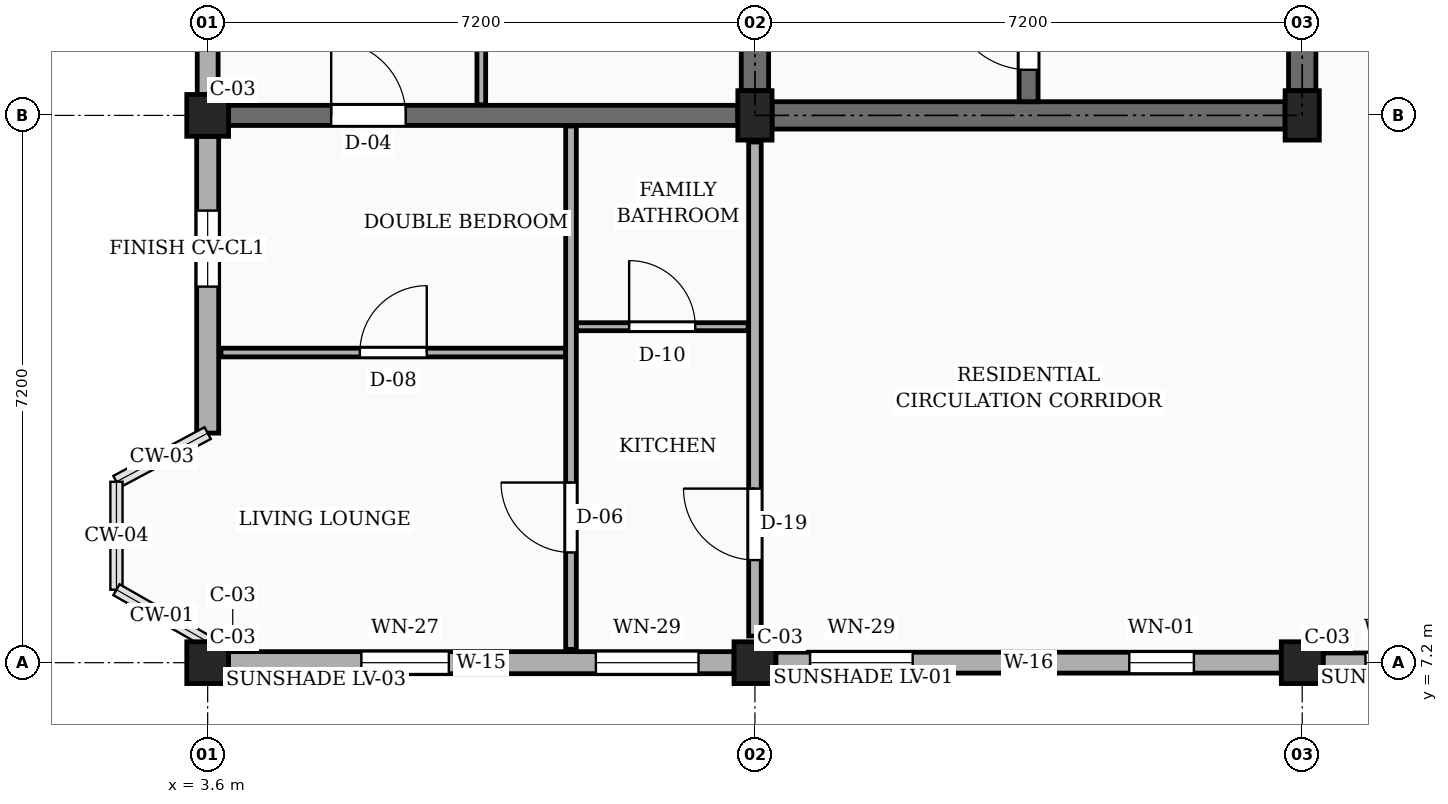
"""IFC4 building model, lengths in metres.
Left out: names, types, materials, properties, quantities, classifications, styles, units other than length and angle.
Written with IfcOpenShell. Run it as: python <this file> out.ifc"""

import sys

from ifc_helpers import new_model, si_unit, direction, frame, frame_2d, origin, origin_2d, place, context, subcontext, project, spatial, rectangle, extrude, element, fill, save


model = new_model("IFC4")
c1 = context("Model", 3, precision=1e-05, world=origin(), true_north=direction((0.0, 1.0)))
c2 = subcontext(c1, "Body", "Model", "MODEL_VIEW")
j1 = project(units=[si_unit("LENGTHUNIT", "METRE"), si_unit("PLANEANGLEUNIT", "RADIAN")], contexts=[c1])
p1 = place(None, origin())
s1 = spatial("IfcSite", under=j1, at=p1, CompositionType="ELEMENT")
p2 = place(p1, origin())
s2 = spatial("IfcBuilding", under=s1, at=p2, CompositionType="ELEMENT")
p3 = place(p2, frame((0.0, 0.0, 10.8)))
s3 = spatial("IfcBuildingStorey", under=s2, at=p3, CompositionType="ELEMENT", Elevation=10.8)
for number, where, z_axis, x_axis in (
    (1, (3.6, 7.2, 0.0), (0.0, 0.0, 1.0), (1.0, 0.0, 0.0)),
    (2, (3.6, 14.4, 0.0), (0.0, 0.0, 1.0), (1.0, 0.0, 0.0)),
    (3, (10.8, 7.2, 0.0), (0.0, 0.0, 1.0), (1.0, 0.0, 0.0)),
):
    element("IfcColumn", number, at=place(p3, frame(where, z_axis=z_axis, x_axis=x_axis)), inside=s3, PredefinedType="COLUMN", context=c2, shape_type="SweptSolid", body=[
        extrude(rectangle(XDim=0.55, YDim=0.55, at=origin_2d()), origin(), (0.0, 0.0, 1.0), 3.15),
    ])
p4 = place(p3, frame((10.8, 14.4, 0.0), z_axis=(0.0, 0.0, 1.0), x_axis=(1.0, 0.0, 0.0)))
e4 = element("IfcColumn", 4, at=p4, inside=s3, PredefinedType="COLUMN", context=c2, shape_type="SweptSolid", body=[
    extrude(rectangle(XDim=0.45, YDim=0.65, at=origin_2d()), origin(), (0.0, 0.0, 1.0), 3.15),
])
p5 = place(p3, frame((18.0, 7.2, 0.0), z_axis=(0.0, 0.0, 1.0), x_axis=(1.0, 0.0, 0.0)))
e5 = element("IfcColumn", 5, at=p5, inside=s3, PredefinedType="COLUMN", context=c2, shape_type="SweptSolid", body=[
    extrude(rectangle(XDim=0.55, YDim=0.55, at=origin_2d()), origin(), (0.0, 0.0, 1.0), 3.15),
])
p6 = place(p3, frame((18.0, 14.4, 0.0), z_axis=(0.0, 0.0, 1.0), x_axis=(1.0, 0.0, 0.0)))
e6 = element("IfcColumn", 6, at=p6, inside=s3, PredefinedType="COLUMN", context=c2, shape_type="SweptSolid", body=[
    extrude(rectangle(XDim=0.45, YDim=0.65, at=origin_2d()), origin(), (0.0, 0.0, 1.0), 3.15),
])
p7 = place(p3, frame((3.875, 14.4, 0.0), z_axis=(0.0, 0.0, 1.0), x_axis=(1.0, 0.0, 0.0)))
e7 = element("IfcWall", 7, at=p7, inside=s3, PredefinedType="SOLIDWALL", context=c2, shape_type="SweptSolid", body=[
    extrude(rectangle(XDim=6.7, YDim=0.265, at=frame_2d((3.35, 0.0))), origin(), (0.0, 0.0, 1.0), 2.17),
])
p8 = place(p7, frame((1.35, 0.0, 0.0)))
e8 = element("IfcOpeningElement", 8, at=p8, cuts=e7, PredefinedType="OPENING", context=c2, shape_type="SweptSolid", body=[
    extrude(rectangle(XDim=0.98, YDim=2.12, at=frame_2d((0.49, 1.06))), frame((0.0, 0.143, 0.0), z_axis=(0.0, -1.0, 0.0), x_axis=(1.0, 0.0, 0.0)), (0.0, 0.0, 1.0), 0.285),
])
p9 = place(p3, frame((3.875, 7.2, 0.0), z_axis=(0.0, 0.0, 1.0), x_axis=(1.0, 0.0, 0.0)))
e9 = element("IfcWall", 9, at=p9, inside=s3, PredefinedType="SOLIDWALL", context=c2, shape_type="SweptSolid", body=[
    extrude(rectangle(XDim=6.65, YDim=0.29, at=frame_2d((3.325, 0.0))), origin(), (0.0, 0.0, 1.0), 2.44),
])
p10 = place(p9, frame((1.748, 0.0, 0.78)))
e10 = element("IfcOpeningElement", 10, at=p10, cuts=e9, PredefinedType="OPENING", context=c2, shape_type="SweptSolid", body=[
    extrude(rectangle(XDim=1.15, YDim=1.44, at=frame_2d((0.575, 0.72))), frame((0.0, 0.155, 0.0), z_axis=(0.0, -1.0, 0.0), x_axis=(1.0, 0.0, 0.0)), (0.0, 0.0, 1.0), 0.31),
])
p11 = place(p9, frame((4.833, 0.0, 0.78)))
e11 = element("IfcOpeningElement", 11, at=p11, cuts=e9, PredefinedType="OPENING", context=c2, shape_type="SweptSolid", body=[
    extrude(rectangle(XDim=1.35, YDim=1.44, at=frame_2d((0.675, 0.72))), frame((0.0, 0.155, 0.0), z_axis=(0.0, -1.0, 0.0), x_axis=(1.0, 0.0, 0.0)), (0.0, 0.0, 1.0), 0.31),
])
p12 = place(p3, frame((11.075, 7.2, 0.0), z_axis=(0.0, 0.0, 1.0), x_axis=(1.0, 0.0, 0.0)))
e12 = element("IfcWall", 12, at=p12, inside=s3, PredefinedType="SOLIDWALL", context=c2, shape_type="SweptSolid", body=[
    extrude(rectangle(XDim=6.65, YDim=0.275, at=frame_2d((3.325, 0.0))), origin(), (0.0, 0.0, 1.0), 2.44),
])
p13 = place(p12, frame((0.45, 0.0, 0.78)))
e13 = element("IfcOpeningElement", 13, at=p13, cuts=e12, PredefinedType="OPENING", context=c2, shape_type="SweptSolid", body=[
    extrude(rectangle(XDim=1.35, YDim=1.44, at=frame_2d((0.675, 0.72))), frame((0.0, 0.147, 0.0), z_axis=(0.0, -1.0, 0.0), x_axis=(1.0, 0.0, 0.0)), (0.0, 0.0, 1.0), 0.295),
])
p14 = place(p12, frame((4.65, 0.0, 0.78)))
e14 = element("IfcOpeningElement", 14, at=p14, cuts=e12, PredefinedType="OPENING", context=c2, shape_type="SweptSolid", body=[
    extrude(rectangle(XDim=0.85, YDim=1.15, at=frame_2d((0.425, 0.575))), frame((0.0, 0.147, 0.0), z_axis=(0.0, -1.0, 0.0), x_axis=(1.0, 0.0, 0.0)), (0.0, 0.0, 1.0), 0.295),
])
p15 = place(p3, frame((18.275, 7.2, 0.0), z_axis=(0.0, 0.0, 1.0), x_axis=(1.0, 0.0, 0.0)))
e15 = element("IfcWall", 15, at=p15, inside=s3, PredefinedType="SOLIDWALL", context=c2, shape_type="SweptSolid", body=[
    extrude(rectangle(XDim=6.65, YDim=0.255, at=frame_2d((3.325, 0.0))), origin(), (0.0, 0.0, 1.0), 2.44),
])
p16 = place(p15, frame((0.558, 0.0, 0.78)))
e16 = element("IfcOpeningElement", 16, at=p16, cuts=e15, PredefinedType="OPENING", context=c2, shape_type="SweptSolid", body=[
    extrude(rectangle(XDim=0.85, YDim=1.15, at=frame_2d((0.425, 0.575))), frame((0.0, 0.137, 0.0), z_axis=(0.0, -1.0, 0.0), x_axis=(1.0, 0.0, 0.0)), (0.0, 0.0, 1.0), 0.275),
])
p17 = place(p15, frame((2.915, 0.0, 0.78)))
e17 = element("IfcOpeningElement", 17, at=p17, cuts=e15, PredefinedType="OPENING", context=c2, shape_type="SweptSolid", body=[
    extrude(rectangle(XDim=1.0, YDim=1.15, at=frame_2d((0.5, 0.575))), frame((0.0, 0.137, 0.0), z_axis=(0.0, -1.0, 0.0), x_axis=(1.0, 0.0, 0.0)), (0.0, 0.0, 1.0), 0.275),
])
p18 = place(p15, frame((5.317, 0.0, 0.78)))
e18 = element("IfcOpeningElement", 18, at=p18, cuts=e15, PredefinedType="OPENING", context=c2, shape_type="SweptSolid", body=[
    extrude(rectangle(XDim=0.88, YDim=1.26, at=frame_2d((0.44, 0.63))), frame((0.0, 0.137, 0.0), z_axis=(0.0, -1.0, 0.0), x_axis=(1.0, 0.0, 0.0)), (0.0, 0.0, 1.0), 0.275),
])
p19 = place(p3, frame((3.6, 21.325, 0.0), z_axis=(0.0, 0.0, 1.0), x_axis=(0.0, -1.0, 0.0)))
e19 = element("IfcWall", 19, at=p19, inside=s3, PredefinedType="SOLIDWALL", context=c2, shape_type="SweptSolid", body=[
    extrude(rectangle(XDim=6.65, YDim=0.275, at=frame_2d((3.325, 0.0))), origin(), (0.0, 0.0, 1.0), 2.44),
])
p20 = place(p19, frame((0.45, 0.0, 0.78)))
e20 = element("IfcOpeningElement", 20, at=p20, cuts=e19, PredefinedType="OPENING", context=c2, shape_type="SweptSolid", body=[
    extrude(rectangle(XDim=0.85, YDim=1.15, at=frame_2d((0.425, 0.575))), frame((0.0, 0.147, 0.0), z_axis=(0.0, -1.0, 0.0), x_axis=(1.0, 0.0, 0.0)), (0.0, 0.0, 1.0), 0.295),
])
p21 = place(p19, frame((4.65, 0.0, 0.78)))
e21 = element("IfcOpeningElement", 21, at=p21, cuts=e19, PredefinedType="OPENING", context=c2, shape_type="SweptSolid", body=[
    extrude(rectangle(XDim=1.0, YDim=1.15, at=frame_2d((0.5, 0.575))), frame((0.0, 0.147, 0.0), z_axis=(0.0, -1.0, 0.0), x_axis=(1.0, 0.0, 0.0)), (0.0, 0.0, 1.0), 0.295),
])
p22 = place(p3, frame((3.6, 14.125, 0.0), z_axis=(0.0, 0.0, 1.0), x_axis=(0.0, -1.0, 0.0)))
e22 = element("IfcWall", 22, at=p22, inside=s3, PredefinedType="SOLIDWALL", context=c2, shape_type="SweptSolid", body=[
    extrude(rectangle(XDim=3.905, YDim=0.29, at=frame_2d((1.953, 0.0))), origin(), (0.0, 0.0, 1.0), 2.44),
])
p23 = place(p22, frame((0.978, 0.0, 0.78)))
e23 = element("IfcOpeningElement", 23, at=p23, cuts=e22, PredefinedType="OPENING", context=c2, shape_type="SweptSolid", body=[
    extrude(rectangle(XDim=1.0, YDim=1.15, at=frame_2d((0.5, 0.575))), frame((0.0, 0.155, 0.0), z_axis=(0.0, -1.0, 0.0), x_axis=(1.0, 0.0, 0.0)), (0.0, 0.0, 1.0), 0.31),
])
p24 = place(p3, frame((10.8, 14.725, 0.0), z_axis=(0.0, 0.0, 1.0), x_axis=(0.0, 1.0, 0.0)))
e24 = element("IfcWall", 24, at=p24, inside=s3, PredefinedType="SHEAR", context=c2, shape_type="SweptSolid", body=[
    extrude(rectangle(XDim=6.55, YDim=0.36, at=frame_2d((3.275, 0.0))), origin(), (0.0, 0.0, 1.0), 2.87),
])
p25 = place(p3, frame((18.0, 14.725, 0.0), z_axis=(0.0, 0.0, 1.0), x_axis=(0.0, 1.0, 0.0)))
e25 = element("IfcWall", 25, at=p25, inside=s3, PredefinedType="SHEAR", context=c2, shape_type="SweptSolid", body=[
    extrude(rectangle(XDim=6.55, YDim=0.36, at=frame_2d((3.275, 0.0))), origin(), (0.0, 0.0, 1.0), 2.87),
])
p26 = place(p25, frame((1.5, 0.0, 0.0)))
e26 = element("IfcOpeningElement", 26, at=p26, cuts=e25, PredefinedType="OPENING", context=c2, shape_type="SweptSolid", body=[
    extrude(rectangle(XDim=1.1, YDim=2.15, at=frame_2d((0.55, 1.075))), frame((0.0, 0.19, 0.0), z_axis=(0.0, -1.0, 0.0), x_axis=(1.0, 0.0, 0.0)), (0.0, 0.0, 1.0), 0.38),
])
p27 = place(p3, frame((11.025, 14.4, 0.0), z_axis=(0.0, 0.0, 1.0), x_axis=(1.0, 0.0, 0.0)))
e27 = element("IfcWall", 27, at=p27, inside=s3, PredefinedType="SHEAR", context=c2, shape_type="SweptSolid", body=[
    extrude(rectangle(XDim=6.75, YDim=0.36, at=frame_2d((3.375, 0.0))), origin(), (0.0, 0.0, 1.0), 2.87),
])
p28 = place(p3, frame((14.4, 14.58, 0.0), z_axis=(0.0, 0.0, 1.0), x_axis=(0.0, 1.0, 0.0)))
e28 = element("IfcWall", 28, at=p28, inside=s3, PredefinedType="SHEAR", context=c2, shape_type="SweptSolid", body=[
    extrude(rectangle(XDim=6.84, YDim=0.25, at=frame_2d((3.42, 0.0))), origin(), (0.0, 0.0, 1.0), 2.87),
])
p29 = place(p28, frame((0.42, 0.0, 0.0)))
e29 = element("IfcOpeningElement", 29, at=p29, cuts=e28, PredefinedType="OPENING", context=c2, shape_type="SweptSolid", body=[
    extrude(rectangle(XDim=1.05, YDim=2.15, at=frame_2d((0.525, 1.075))), frame((0.0, 0.135, 0.0), z_axis=(0.0, -1.0, 0.0), x_axis=(1.0, 0.0, 0.0)), (0.0, 0.0, 1.0), 0.27),
])
p30 = place(p3, frame((10.8, 7.55, 0.0), z_axis=(0.0, 0.0, 1.0), x_axis=(0.0, 1.0, 0.0)))
e30 = element("IfcWall", 30, at=p30, inside=s3, PredefinedType="PARTITIONING", context=c2, shape_type="SweptSolid", body=[
    extrude(rectangle(XDim=6.5, YDim=0.165, at=frame_2d((3.25, 0.0))), origin(), (0.0, 0.0, 1.0), 2.22),
])
p31 = place(p30, frame((1.0, 0.0, 0.0)))
e31 = element("IfcOpeningElement", 31, at=p31, cuts=e30, PredefinedType="OPENING", context=c2, shape_type="SweptSolid", body=[
    extrude(rectangle(XDim=0.94, YDim=2.12, at=frame_2d((0.47, 1.06))), frame((0.0, 0.093, 0.0), z_axis=(0.0, -1.0, 0.0), x_axis=(1.0, 0.0, 0.0)), (0.0, 0.0, 1.0), 0.185),
])
p32 = place(p3, frame((3.775, 11.28, 0.0), z_axis=(0.0, 0.0, 1.0), x_axis=(1.0, 0.0, 0.0)))
e32 = element("IfcWall", 32, at=p32, inside=s3, PredefinedType="PARTITIONING", context=c2, shape_type="SweptSolid", body=[
    extrude(rectangle(XDim=4.535, YDim=0.115, at=frame_2d((2.268, 0.0))), origin(), (0.0, 0.0, 1.0), 2.305),
])
p33 = place(p32, frame((1.827, 0.0, 0.0)))
e33 = element("IfcOpeningElement", 33, at=p33, cuts=e32, PredefinedType="OPENING", context=c2, shape_type="SweptSolid", body=[
    extrude(rectangle(XDim=0.88, YDim=2.08, at=frame_2d((0.44, 1.04))), frame((0.0, 0.067, 0.0), z_axis=(0.0, -1.0, 0.0), x_axis=(1.0, 0.0, 0.0)), (0.0, 0.0, 1.0), 0.135),
])
p34 = place(p3, frame((8.45, 11.62, 0.0), z_axis=(0.0, 0.0, 1.0), x_axis=(1.0, 0.0, 0.0)))
e34 = element("IfcWall", 34, at=p34, inside=s3, PredefinedType="PARTITIONING", context=c2, shape_type="SweptSolid", body=[
    extrude(rectangle(XDim=2.26, YDim=0.105, at=frame_2d((1.13, 0.0))), origin(), (0.0, 0.0, 1.0), 2.305),
])
p35 = place(p34, frame((0.695, 0.0, 0.0)))
e35 = element("IfcOpeningElement", 35, at=p35, cuts=e34, PredefinedType="OPENING", context=c2, shape_type="SweptSolid", body=[
    extrude(rectangle(XDim=0.87, YDim=2.05, at=frame_2d((0.435, 1.025))), frame((0.0, 0.062, 0.0), z_axis=(0.0, -1.0, 0.0), x_axis=(1.0, 0.0, 0.0)), (0.0, 0.0, 1.0), 0.125),
])
p36 = place(p3, frame((8.38, 7.375, 0.0), z_axis=(0.0, 0.0, 1.0), x_axis=(0.0, 1.0, 0.0)))
e36 = element("IfcWall", 36, at=p36, inside=s3, PredefinedType="PARTITIONING", context=c2, shape_type="SweptSolid", body=[
    extrude(rectangle(XDim=6.885, YDim=0.14, at=frame_2d((3.442, 0.0))), origin(), (0.0, 0.0, 1.0), 2.305),
])
p37 = place(p36, frame((1.275, 0.0, 0.0)))
e37 = element("IfcOpeningElement", 37, at=p37, cuts=e36, PredefinedType="OPENING", context=c2, shape_type="SweptSolid", body=[
    extrude(rectangle(XDim=0.92, YDim=2.1, at=frame_2d((0.46, 1.05))), frame((0.0, 0.08, 0.0), z_axis=(0.0, -1.0, 0.0), x_axis=(1.0, 0.0, 0.0)), (0.0, 0.0, 1.0), 0.16),
])
p38 = place(p3, frame((7.2, 14.54, 0.0), z_axis=(0.0, 0.0, 1.0), x_axis=(0.0, 1.0, 0.0)))
e38 = element("IfcWall", 38, at=p38, inside=s3, PredefinedType="PARTITIONING", context=c2, shape_type="SweptSolid", body=[
    extrude(rectangle(XDim=6.92, YDim=0.115, at=frame_2d((3.46, 0.0))), origin(), (0.0, 0.0, 1.0), 2.305),
])
p39 = place(p38, frame((1.05, 0.0, 0.0)))
e39 = element("IfcOpeningElement", 39, at=p39, cuts=e38, PredefinedType="OPENING", context=c2, shape_type="SweptSolid", body=[
    extrude(rectangle(XDim=0.87, YDim=2.05, at=frame_2d((0.435, 1.025))), frame((0.0, 0.067, 0.0), z_axis=(0.0, -1.0, 0.0), x_axis=(1.0, 0.0, 0.0)), (0.0, 0.0, 1.0), 0.135),
])
p40 = place(p38, frame((4.45, 0.0, 0.0)))
e40 = element("IfcOpeningElement", 40, at=p40, cuts=e38, PredefinedType="OPENING", context=c2, shape_type="SweptSolid", body=[
    extrude(rectangle(XDim=0.88, YDim=2.08, at=frame_2d((0.44, 1.04))), frame((0.0, 0.067, 0.0), z_axis=(0.0, -1.0, 0.0), x_axis=(1.0, 0.0, 0.0)), (0.0, 0.0, 1.0), 0.135),
])
p41 = place(p10, origin())
e41 = element("IfcWindow", 41, at=p41, inside=s3, PartitioningType="SINGLE_PANEL", PredefinedType="WINDOW", context=c2, shape_type="SweptSolid", body=[
    extrude(rectangle(XDim=1.15, YDim=1.44, at=frame_2d((0.575, 0.72))), frame((0.0, 0.03, 0.0), z_axis=(0.0, -1.0, 0.0), x_axis=(1.0, 0.0, 0.0)), (0.0, 0.0, 1.0), 0.06),
])
fill(e10, e41)
p42 = place(p11, origin())
e42 = element("IfcWindow", 42, at=p42, inside=s3, PartitioningType="SINGLE_PANEL", PredefinedType="WINDOW", context=c2, shape_type="SweptSolid", body=[
    extrude(rectangle(XDim=1.35, YDim=1.44, at=frame_2d((0.675, 0.72))), frame((0.0, 0.03, 0.0), z_axis=(0.0, -1.0, 0.0), x_axis=(1.0, 0.0, 0.0)), (0.0, 0.0, 1.0), 0.06),
])
fill(e11, e42)
p43 = place(p13, origin())
e43 = element("IfcWindow", 43, at=p43, inside=s3, PartitioningType="SINGLE_PANEL", PredefinedType="WINDOW", context=c2, shape_type="SweptSolid", body=[
    extrude(rectangle(XDim=1.35, YDim=1.44, at=frame_2d((0.675, 0.72))), frame((0.0, 0.03, 0.0), z_axis=(0.0, -1.0, 0.0), x_axis=(1.0, 0.0, 0.0)), (0.0, 0.0, 1.0), 0.06),
])
fill(e13, e43)
p44 = place(p14, origin())
e44 = element("IfcWindow", 44, at=p44, inside=s3, PartitioningType="SINGLE_PANEL", PredefinedType="WINDOW", context=c2, shape_type="SweptSolid", body=[
    extrude(rectangle(XDim=0.85, YDim=1.15, at=frame_2d((0.425, 0.575))), frame((0.0, 0.03, 0.0), z_axis=(0.0, -1.0, 0.0), x_axis=(1.0, 0.0, 0.0)), (0.0, 0.0, 1.0), 0.06),
])
fill(e14, e44)
p45 = place(p16, origin())
e45 = element("IfcWindow", 45, at=p45, inside=s3, PartitioningType="SINGLE_PANEL", PredefinedType="WINDOW", context=c2, shape_type="SweptSolid", body=[
    extrude(rectangle(XDim=0.85, YDim=1.15, at=frame_2d((0.425, 0.575))), frame((0.0, 0.03, 0.0), z_axis=(0.0, -1.0, 0.0), x_axis=(1.0, 0.0, 0.0)), (0.0, 0.0, 1.0), 0.06),
])
fill(e16, e45)
p46 = place(p23, origin())
e46 = element("IfcWindow", 46, at=p46, inside=s3, PartitioningType="SINGLE_PANEL", PredefinedType="WINDOW", context=c2, shape_type="SweptSolid", body=[
    extrude(rectangle(XDim=1.0, YDim=1.15, at=frame_2d((0.5, 0.575))), frame((0.0, 0.03, 0.0), z_axis=(0.0, -1.0, 0.0), x_axis=(1.0, 0.0, 0.0)), (0.0, 0.0, 1.0), 0.06),
])
fill(e23, e46)
p47 = place(p29, origin())
e47 = element("IfcDoor", 47, at=p47, inside=s3, OperationType="SINGLE_SWING_RIGHT", PredefinedType="DOOR", context=c2, shape_type="SweptSolid", body=[
    extrude(rectangle(XDim=1.05, YDim=2.15, at=frame_2d((0.525, 1.075))), frame((0.0, 0.025, 0.0), z_axis=(0.0, -1.0, 0.0), x_axis=(1.0, 0.0, 0.0)), (0.0, 0.0, 1.0), 0.05),
])
fill(e29, e47)
p48 = place(p31, origin())
e48 = element("IfcDoor", 48, at=p48, inside=s3, OperationType="SINGLE_SWING_RIGHT", PredefinedType="DOOR", context=c2, shape_type="SweptSolid", body=[
    extrude(rectangle(XDim=0.94, YDim=2.12, at=frame_2d((0.47, 1.06))), frame((0.0, 0.025, 0.0), z_axis=(0.0, -1.0, 0.0), x_axis=(1.0, 0.0, 0.0)), (0.0, 0.0, 1.0), 0.05),
])
fill(e31, e48)
p49 = place(p33, origin())
e49 = element("IfcDoor", 49, at=p49, inside=s3, OperationType="SINGLE_SWING_RIGHT", PredefinedType="DOOR", context=c2, shape_type="SweptSolid", body=[
    extrude(rectangle(XDim=0.88, YDim=2.08, at=frame_2d((0.44, 1.04))), frame((0.0, 0.025, 0.0), z_axis=(0.0, -1.0, 0.0), x_axis=(1.0, 0.0, 0.0)), (0.0, 0.0, 1.0), 0.05),
])
fill(e33, e49)
p50 = place(p35, origin())
e50 = element("IfcDoor", 50, at=p50, inside=s3, OperationType="SINGLE_SWING_LEFT", PredefinedType="DOOR", context=c2, shape_type="SweptSolid", body=[
    extrude(rectangle(XDim=0.87, YDim=2.05, at=frame_2d((0.435, 1.025))), frame((0.0, 0.025, 0.0), z_axis=(0.0, -1.0, 0.0), x_axis=(1.0, 0.0, 0.0)), (0.0, 0.0, 1.0), 0.05),
])
fill(e35, e50)
p51 = place(p37, origin())
e51 = element("IfcDoor", 51, at=p51, inside=s3, OperationType="SINGLE_SWING_RIGHT", PredefinedType="DOOR", context=c2, shape_type="SweptSolid", body=[
    extrude(rectangle(XDim=0.92, YDim=2.1, at=frame_2d((0.46, 1.05))), frame((0.0, 0.025, 0.0), z_axis=(0.0, -1.0, 0.0), x_axis=(1.0, 0.0, 0.0)), (0.0, 0.0, 1.0), 0.05),
])
fill(e37, e51)
p52 = place(p8, origin())
e52 = element("IfcDoor", 52, at=p52, inside=s3, OperationType="SINGLE_SWING_LEFT", PredefinedType="DOOR", context=c2, shape_type="SweptSolid", body=[
    extrude(rectangle(XDim=0.98, YDim=2.12, at=frame_2d((0.49, 1.06))), frame((0.0, 0.025, 0.0), z_axis=(0.0, -1.0, 0.0), x_axis=(1.0, 0.0, 0.0)), (0.0, 0.0, 1.0), 0.05),
])
fill(e8, e52)
save(model, sys.argv[1])
